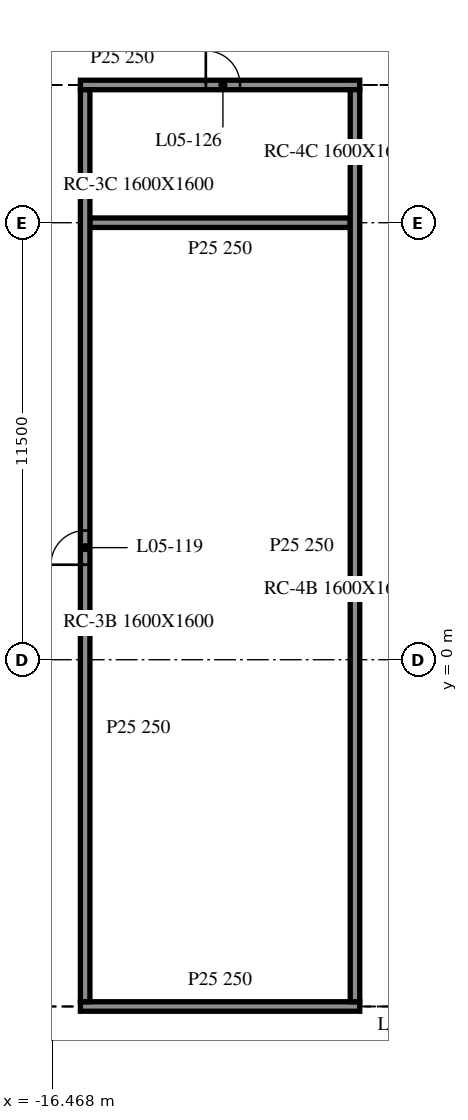
"""IFC4 building model, lengths in metres.
Left out: names, types, materials, properties, quantities, classifications, styles, units other than length and angle.
Written with IfcOpenShell. Run it as: python <this file> out.ifc"""

import sys

from ifc_helpers import new_model, si_unit, direction, frame, frame_2d, origin, place, context, subcontext, project, spatial, rectangle, extrude, element, fill, save


model = new_model("IFC4")
c1 = context("Model", 3, precision=1e-05, world=origin(), true_north=direction((0.0, 1.0)))
c2 = subcontext(c1, "Body", "Model", "MODEL_VIEW")
j1 = project(units=[si_unit("LENGTHUNIT", "METRE"), si_unit("PLANEANGLEUNIT", "RADIAN")], contexts=[c1])
p1 = place(None, origin())
s1 = spatial("IfcSite", under=j1, at=p1, CompositionType="ELEMENT")
p2 = place(p1, origin())
s2 = spatial("IfcBuilding", under=s1, at=p2, CompositionType="ELEMENT")
p3 = place(p2, frame((0.0, 0.0, 24.4)))
s3 = spatial("IfcBuildingStorey", under=s2, at=p3, CompositionType="ELEMENT", Elevation=24.4)
p4 = place(p3, frame((-15.725, -9.125, 0.0), z_axis=(0.0, 0.0, 1.0), x_axis=(1.0, 0.0, 0.0)))
e1 = element("IfcWall", 1, at=p4, inside=s3, PredefinedType="PARTITIONING", context=c2, shape_type="SweptSolid", body=[
    extrude(rectangle(XDim=7.35, YDim=0.25, at=frame_2d((3.675, 0.0))), origin(), (0.0, 0.0, 1.0), 3.96),
])
p5 = place(p3, frame((-15.475, 11.5, 0.0), z_axis=(0.0, 0.0, 1.0), x_axis=(1.0, 0.0, 0.0)))
e2 = element("IfcWall", 2, at=p5, inside=s3, PredefinedType="PARTITIONING", context=c2, shape_type="SweptSolid", body=[
    extrude(rectangle(XDim=6.85, YDim=0.25, at=frame_2d((3.425, 0.0))), origin(), (0.0, 0.0, 1.0), 3.96),
])
p6 = place(p3, frame((-15.725, 15.125, 0.0), z_axis=(0.0, 0.0, 1.0), x_axis=(1.0, 0.0, 0.0)))
e3 = element("IfcWall", 3, at=p6, inside=s3, PredefinedType="PARTITIONING", context=c2, shape_type="SweptSolid", body=[
    extrude(rectangle(XDim=7.35, YDim=0.25, at=frame_2d((3.675, 0.0))), origin(), (0.0, 0.0, 1.0), 3.96),
])
p7 = place(p6, frame((3.3, 0.0, 0.0)))
e4 = element("IfcOpeningElement", 4, at=p7, cuts=e3, PredefinedType="OPENING", context=c2, shape_type="SweptSolid", body=[
    extrude(rectangle(XDim=0.9, YDim=2.1, at=frame_2d((0.45, 1.05))), frame((0.0, 0.135, 0.0), z_axis=(0.0, -1.0, 0.0), x_axis=(1.0, 0.0, 0.0)), (0.0, 0.0, 1.0), 0.27),
])
p8 = place(p3, frame((-15.6, -9.0, 0.0), z_axis=(0.0, 0.0, 1.0), x_axis=(0.0, 1.0, 0.0)))
e5 = element("IfcWall", 5, at=p8, inside=s3, PredefinedType="PARTITIONING", context=c2, shape_type="SweptSolid", body=[
    extrude(rectangle(XDim=24.0, YDim=0.25, at=frame_2d((12.0, 0.0))), origin(), (0.0, 0.0, 1.0), 3.96),
])
p9 = place(p8, frame((11.5, 0.0, 0.0)))
e6 = element("IfcOpeningElement", 6, at=p9, cuts=e5, PredefinedType="OPENING", context=c2, shape_type="SweptSolid", body=[
    extrude(rectangle(XDim=0.9, YDim=2.1, at=frame_2d((0.45, 1.05))), frame((0.0, 0.135, 0.0), z_axis=(0.0, -1.0, 0.0), x_axis=(1.0, 0.0, 0.0)), (0.0, 0.0, 1.0), 0.27),
])
p10 = place(p3, frame((-8.5, -9.0, 0.0), z_axis=(0.0, 0.0, 1.0), x_axis=(0.0, 1.0, 0.0)))
e7 = element("IfcWall", 7, at=p10, inside=s3, PredefinedType="PARTITIONING", context=c2, shape_type="SweptSolid", body=[
    extrude(rectangle(XDim=24.0, YDim=0.25, at=frame_2d((12.0, 0.0))), origin(), (0.0, 0.0, 1.0), 3.96),
])
p11 = place(p9, origin())
e8 = element("IfcDoor", 8, at=p11, inside=s3, OperationType="SINGLE_SWING_RIGHT", PredefinedType="DOOR", context=c2, shape_type="SweptSolid", body=[
    extrude(rectangle(XDim=0.9, YDim=2.1, at=frame_2d((0.45, 1.05))), frame((0.0, 0.025, 0.0), z_axis=(0.0, -1.0, 0.0), x_axis=(1.0, 0.0, 0.0)), (0.0, 0.0, 1.0), 0.05),
])
fill(e6, e8)
p12 = place(p7, origin())
e9 = element("IfcDoor", 9, at=p12, inside=s3, OperationType="SINGLE_SWING_LEFT", PredefinedType="DOOR", context=c2, shape_type="SweptSolid", body=[
    extrude(rectangle(XDim=0.9, YDim=2.1, at=frame_2d((0.45, 1.05))), frame((0.0, 0.025, 0.0), z_axis=(0.0, -1.0, 0.0), x_axis=(1.0, 0.0, 0.0)), (0.0, 0.0, 1.0), 0.05),
])
fill(e4, e9)
save(model, sys.argv[1])
